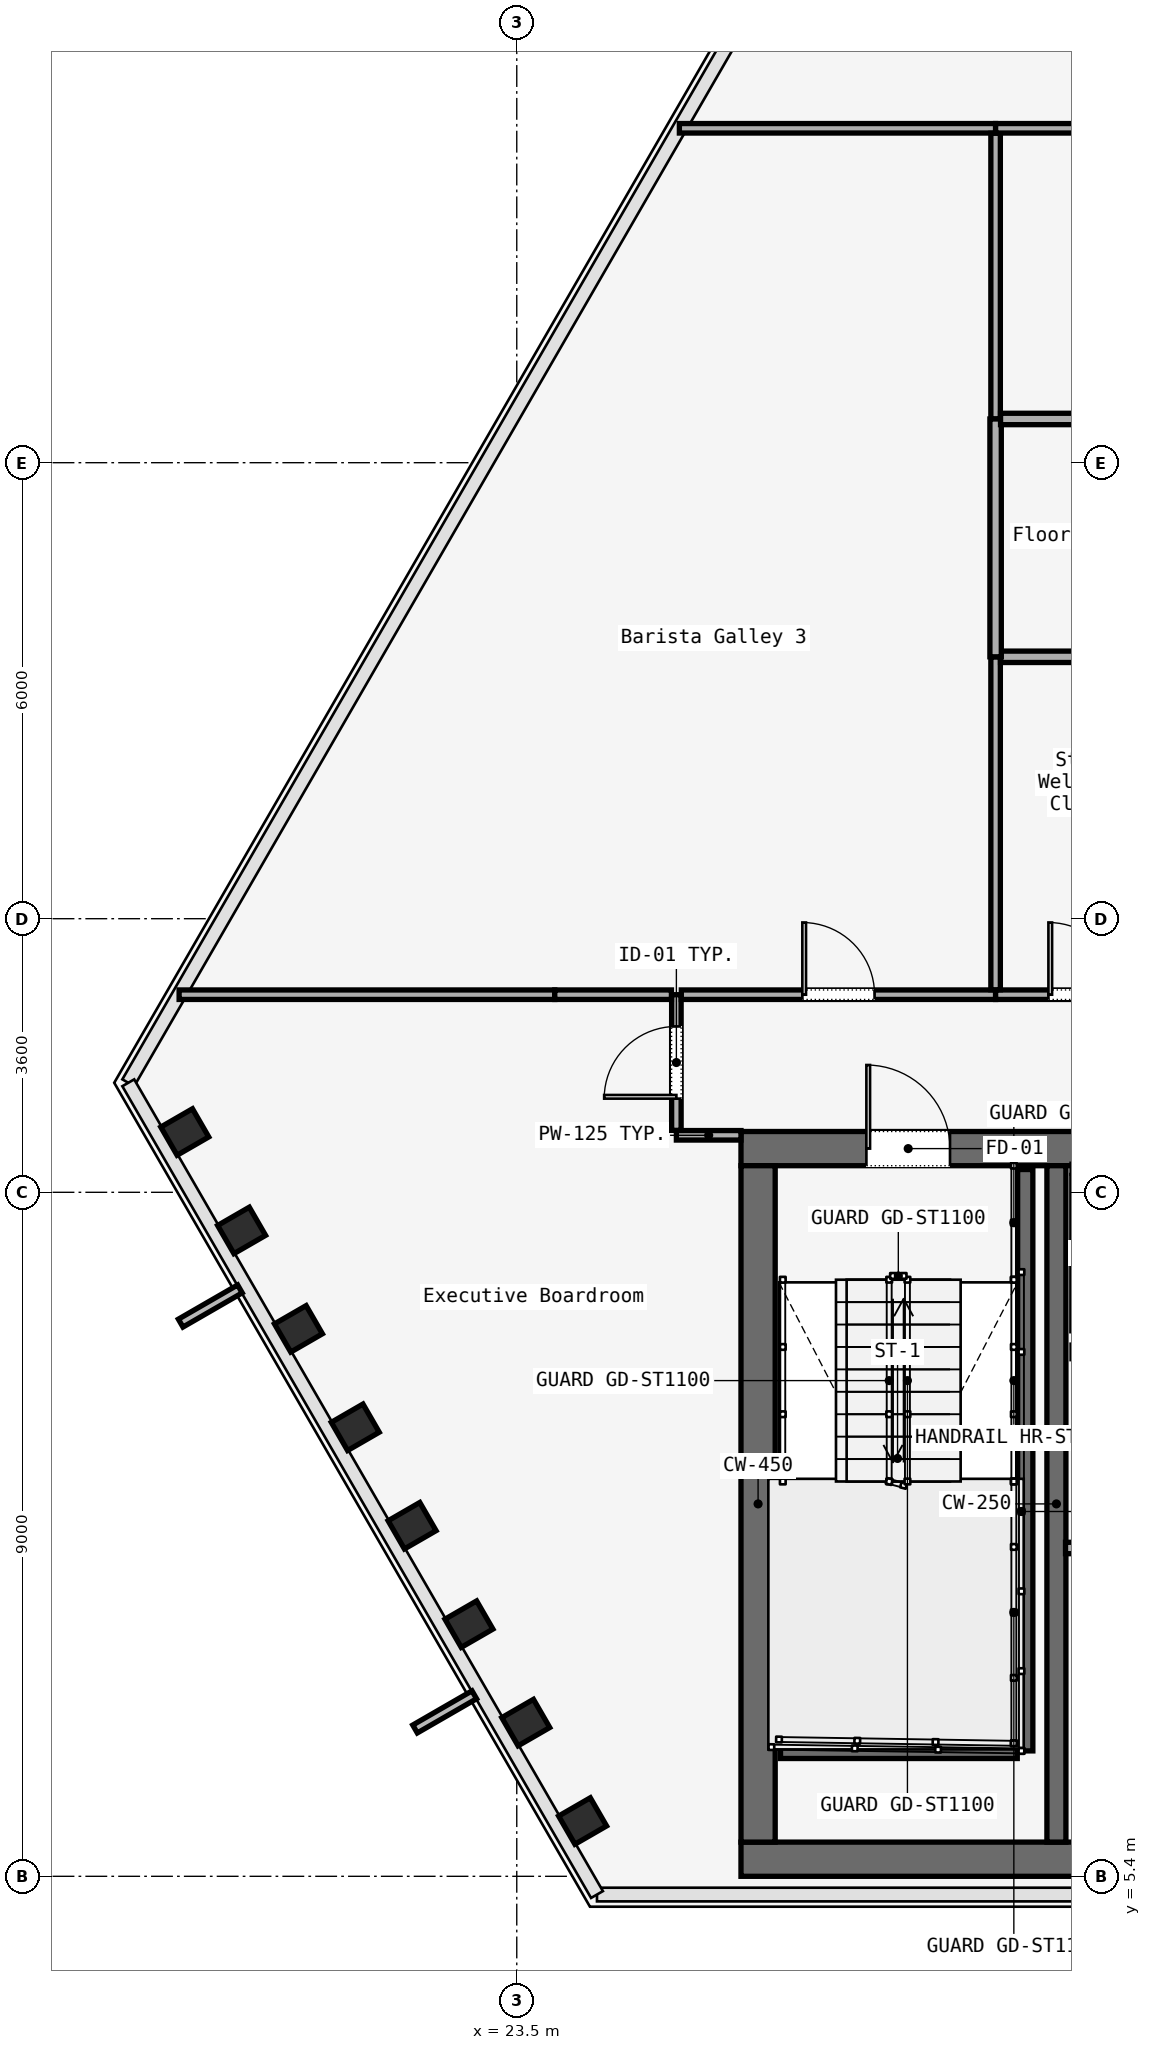
"""IFC4 building model, lengths in metres.
Left out: names, types, materials, properties, quantities, classifications, styles, units other than length and angle.
Written with IfcOpenShell. Run it as: python <this file> out.ifc"""

import sys

from ifc_helpers import new_model, si_unit, direction, frame, frame_2d, origin, origin_2d, place, context, subcontext, project, spatial, rectangle, i_section, extrude, element, fill, save


model = new_model("IFC4")
c1 = context("Model", 3, precision=1e-05, world=origin(), true_north=direction((0.0, 1.0)))
c2 = subcontext(c1, "Body", "Model", "MODEL_VIEW")
j1 = project(units=[si_unit("LENGTHUNIT", "METRE"), si_unit("PLANEANGLEUNIT", "RADIAN")], contexts=[c1])
p1 = place(None, origin())
s1 = spatial("IfcSite", under=j1, at=p1, CompositionType="ELEMENT")
p2 = place(p1, origin())
s2 = spatial("IfcBuilding", under=s1, at=p2, CompositionType="ELEMENT")
p3 = place(p2, frame((0.0, 0.0, 134.6)))
s3 = spatial("IfcBuildingStorey", under=s2, at=p3, CompositionType="ELEMENT", Elevation=134.6)
p4 = place(p3, frame((26.45, 14.975, 0.0), z_axis=(0.0, 0.0, 1.0), x_axis=(1.0, 0.0, 0.0)))
e1 = element("IfcWall", 1, at=p4, inside=s3, PredefinedType="SOLIDWALL", context=c2, shape_type="SweptSolid", body=[
    extrude(rectangle(XDim=31.1, YDim=0.45, at=frame_2d((15.55, 0.0))), origin(), (0.0, 0.0, 1.0), 3.58),
])
p5 = place(p4, frame((1.65, 0.0, 0.0)))
e2 = element("IfcOpeningElement", 2, at=p5, cuts=e1, PredefinedType="OPENING", context=c2, shape_type="SweptSolid", body=[
    extrude(rectangle(XDim=1.1, YDim=2.2, at=frame_2d((0.55, 1.1))), frame((0.0, 0.225, 0.0), z_axis=(0.0, -1.0, 0.0), x_axis=(1.0, 0.0, 0.0)), (0.0, 0.0, 1.0), 0.45),
])
p6 = place(p4, frame((13.65, 0.0, 0.0)))
e3 = element("IfcOpeningElement", 3, at=p6, cuts=e1, PredefinedType="OPENING", context=c2, shape_type="SweptSolid", body=[
    extrude(rectangle(XDim=1.1, YDim=2.2, at=frame_2d((0.55, 1.1))), frame((0.0, 0.225, 0.0), z_axis=(0.0, -1.0, 0.0), x_axis=(1.0, 0.0, 0.0)), (0.0, 0.0, 1.0), 0.45),
])
p7 = place(p4, frame((25.55, 0.0, 0.0)))
e4 = element("IfcOpeningElement", 4, at=p7, cuts=e1, PredefinedType="OPENING", context=c2, shape_type="SweptSolid", body=[
    extrude(rectangle(XDim=1.1, YDim=2.2, at=frame_2d((0.55, 1.1))), frame((0.0, 0.225, 0.0), z_axis=(0.0, -1.0, 0.0), x_axis=(1.0, 0.0, 0.0)), (0.0, 0.0, 1.0), 0.45),
])
p8 = place(p4, frame((10.7, 0.0, 0.0)))
e5 = element("IfcOpeningElement", 5, at=p8, cuts=e1, PredefinedType="OPENING", context=c2, shape_type="SweptSolid", body=[
    extrude(rectangle(XDim=1.4, YDim=2.2, at=frame_2d((0.7, 1.1))), frame((0.0, 0.225, 0.0), z_axis=(0.0, -1.0, 0.0), x_axis=(1.0, 0.0, 0.0)), (0.0, 0.0, 1.0), 0.45),
])
p9 = place(p4, frame((19.35, 0.0, 0.0)))
e6 = element("IfcOpeningElement", 6, at=p9, cuts=e1, PredefinedType="OPENING", context=c2, shape_type="SweptSolid", body=[
    extrude(rectangle(XDim=1.1, YDim=2.2, at=frame_2d((0.55, 1.1))), frame((0.0, 0.225, 0.0), z_axis=(0.0, -1.0, 0.0), x_axis=(1.0, 0.0, 0.0)), (0.0, 0.0, 1.0), 0.45),
])
p10 = place(p4, frame((21.4, 0.0, 0.0)))
e7 = element("IfcOpeningElement", 7, at=p10, cuts=e1, PredefinedType="OPENING", context=c2, shape_type="SweptSolid", body=[
    extrude(rectangle(XDim=0.9, YDim=2.1, at=frame_2d((0.45, 1.05))), frame((0.0, 0.225, 0.0), z_axis=(0.0, -1.0, 0.0), x_axis=(1.0, 0.0, 0.0)), (0.0, 0.0, 1.0), 0.45),
])
p11 = place(p4, frame((23.35, 0.0, 0.0)))
e8 = element("IfcOpeningElement", 8, at=p11, cuts=e1, PredefinedType="OPENING", context=c2, shape_type="SweptSolid", body=[
    extrude(rectangle(XDim=1.3, YDim=2.3, at=frame_2d((0.65, 1.15))), frame((0.0, 0.225, 0.0), z_axis=(0.0, -1.0, 0.0), x_axis=(1.0, 0.0, 0.0)), (0.0, 0.0, 1.0), 0.45),
])
p12 = place(p3, frame((26.45, 5.625, 0.0), z_axis=(0.0, 0.0, 1.0), x_axis=(1.0, 0.0, 0.0)))
e9 = element("IfcWall", 9, at=p12, inside=s3, PredefinedType="SOLIDWALL", context=c2, shape_type="SweptSolid", body=[
    extrude(rectangle(XDim=31.1, YDim=0.45, at=frame_2d((15.55, 0.0))), origin(), (0.0, 0.0, 1.0), 3.58),
])
p13 = place(p3, frame((26.675, 5.85, 0.0), z_axis=(0.0, 0.0, 1.0), x_axis=(0.0, 1.0, 0.0)))
e10 = element("IfcWall", 10, at=p13, inside=s3, PredefinedType="SOLIDWALL", context=c2, shape_type="SweptSolid", body=[
    extrude(rectangle(XDim=8.9, YDim=0.45, at=frame_2d((4.45, 0.0))), origin(), (0.0, 0.0, 1.0), 3.58),
])
p14 = place(p3, frame((30.6, 5.85, 0.0), z_axis=(0.0, 0.0, 1.0), x_axis=(0.0, 1.0, 0.0)))
e11 = element("IfcWall", 11, at=p14, inside=s3, PredefinedType="SOLIDWALL", context=c2, shape_type="SweptSolid", body=[
    extrude(rectangle(XDim=8.9, YDim=0.25, at=frame_2d((4.45, 0.0))), origin(), (0.0, 0.0, 1.0), 3.58),
])
p15 = place(p3, frame((19.132, 15.194, 0.0), z_axis=(-0.01278033811, -0.129291039507, 0.99152432651), x_axis=(-0.41310613672, 0.903705531327, 0.112515032126)))
e12 = element("IfcColumn", 12, at=p15, inside=s3, PredefinedType="COLUMN", context=c2, shape_type="SweptSolid", body=[
    extrude(i_section(OverallWidth=0.428, OverallDepth=0.481, WebThickness=0.051, FlangeThickness=0.065, FilletRadius=0.015, at=origin_2d()), origin(), (0.0, 0.0, 1.0), 3.61),
])
p16 = place(p3, frame((19.88, 13.898, 0.0), z_axis=(-0.02283170652, -0.112261536212, 0.993416358162), x_axis=(-0.31850718371, 0.942714283027, 0.099211665148)))
e13 = element("IfcColumn", 13, at=p16, inside=s3, PredefinedType="COLUMN", context=c2, shape_type="SweptSolid", body=[
    extrude(i_section(OverallWidth=0.428, OverallDepth=0.481, WebThickness=0.051, FlangeThickness=0.065, FilletRadius=0.015, at=origin_2d()), origin(), (0.0, 0.0, 1.0), 3.604),
])
p17 = place(p3, frame((20.627, 12.603, 0.0), z_axis=(-0.032772891404, -0.095129593681, 0.994925272568), x_axis=(-0.1920823235, 0.977502738868, 0.087136539429)))
e14 = element("IfcColumn", 14, at=p17, inside=s3, PredefinedType="COLUMN", context=c2, shape_type="SweptSolid", body=[
    extrude(i_section(OverallWidth=0.428, OverallDepth=0.481, WebThickness=0.051, FlangeThickness=0.065, FilletRadius=0.015, at=origin_2d()), origin(), (0.0, 0.0, 1.0), 3.598),
])
p18 = place(p3, frame((21.375, 11.308, 0.0), z_axis=(-0.042862996572, -0.077914195036, 0.99603822303), x_axis=(-0.022307462558, 0.996780559309, 0.077012295755)))
e15 = element("IfcColumn", 15, at=p18, inside=s3, PredefinedType="COLUMN", context=c2, shape_type="SweptSolid", body=[
    extrude(i_section(OverallWidth=0.428, OverallDepth=0.481, WebThickness=0.051, FlangeThickness=0.065, FilletRadius=0.015, at=origin_2d()), origin(), (0.0, 0.0, 1.0), 3.594),
])
p19 = place(p3, frame((22.123, 10.013, 0.0), z_axis=(-0.052886696014, -0.060636160468, 0.996757871014), x_axis=(0.190588187713, 0.979193970966, 0.069680054023)))
e16 = element("IfcColumn", 16, at=p19, inside=s3, PredefinedType="COLUMN", context=c2, shape_type="SweptSolid", body=[
    extrude(i_section(OverallWidth=0.428, OverallDepth=0.481, WebThickness=0.051, FlangeThickness=0.065, FilletRadius=0.015, at=origin_2d()), origin(), (0.0, 0.0, 1.0), 3.592),
])
p20 = place(p3, frame((22.871, 8.718, 0.0), z_axis=(-0.062899711011, -0.043315800988, 0.997079418973), x_axis=(0.427589893867, 0.90155000331, 0.066139807948)))
e17 = element("IfcColumn", 17, at=p20, inside=s3, PredefinedType="COLUMN", context=c2, shape_type="SweptSolid", body=[
    extrude(i_section(OverallWidth=0.428, OverallDepth=0.481, WebThickness=0.051, FlangeThickness=0.065, FilletRadius=0.015, at=origin_2d()), origin(), (0.0, 0.0, 1.0), 3.59),
])
p21 = place(p3, frame((23.618, 7.423, 0.0), z_axis=(-0.07288998382, -0.025973856175, 0.997001709655), x_axis=(0.645498709564, 0.760815827084, 0.0670126347)))
e18 = element("IfcColumn", 18, at=p21, inside=s3, PredefinedType="COLUMN", context=c2, shape_type="SweptSolid", body=[
    extrude(i_section(OverallWidth=0.428, OverallDepth=0.481, WebThickness=0.051, FlangeThickness=0.065, FilletRadius=0.015, at=origin_2d()), origin(), (0.0, 0.0, 1.0), 3.591),
])
p22 = place(p3, frame((24.366, 6.128, 0.0), z_axis=(-0.082845480977, -0.008699115312, 0.996524436065), x_axis=(0.806081735836, 0.587390797431, 0.072140739143)))
e19 = element("IfcColumn", 19, at=p22, inside=s3, PredefinedType="COLUMN", context=c2, shape_type="SweptSolid", body=[
    extrude(i_section(OverallWidth=0.428, OverallDepth=0.481, WebThickness=0.051, FlangeThickness=0.065, FilletRadius=0.015, at=origin_2d()), origin(), (0.0, 0.0, 1.0), 3.592),
])
p23 = place(p3, frame((30.19, 14.7, 0.0), z_axis=(0.0, 0.0, 1.0), x_axis=(0.0, -1.0, 0.0)))
e20 = element("IfcWall", 20, at=p23, inside=s3, PredefinedType="SOLIDWALL", context=c2, shape_type="SweptSolid", body=[
    extrude(rectangle(XDim=7.65, YDim=0.2, at=frame_2d((3.825, 0.0))), origin(), (0.0, 0.0, 1.0), 3.8),
])
p24 = place(p3, frame((26.97, 7.05, 0.0), z_axis=(0.0, 0.0, 1.0), x_axis=(1.0, 0.0, 0.0)))
e21 = element("IfcWall", 21, at=p24, inside=s3, PredefinedType="SOLIDWALL", context=c2, shape_type="SweptSolid", body=[
    extrude(rectangle(XDim=3.115, YDim=0.2, at=frame_2d((1.558, 0.0))), origin(), (0.0, 0.0, 1.0), 3.8),
])
p25 = place(p3, frame((30.72, 9.72, 0.0), z_axis=(0.0, 0.0, 1.0), x_axis=(1.0, 0.0, 0.0)))
e22 = element("IfcWall", 22, at=p25, inside=s3, PredefinedType="PARTITIONING", context=c2, shape_type="SweptSolid", body=[
    extrude(rectangle(XDim=7.96, YDim=0.15, at=frame_2d((3.98, 0.0))), origin(), (0.0, 0.0, 1.0), 3.01),
])
p26 = place(p25, frame((1.5, 0.0, 0.0)))
e23 = element("IfcOpeningElement", 23, at=p26, cuts=e22, PredefinedType="OPENING", context=c2, shape_type="SweptSolid", body=[
    extrude(rectangle(XDim=0.95, YDim=2.2, at=frame_2d((0.475, 1.1))), frame((0.0, 0.075, 0.0), z_axis=(0.0, -1.0, 0.0), x_axis=(1.0, 0.0, 0.0)), (0.0, 0.0, 1.0), 0.15),
])
p27 = place(p25, frame((6.21, 0.0, 0.0)))
e24 = element("IfcOpeningElement", 24, at=p27, cuts=e22, PredefinedType="OPENING", context=c2, shape_type="SweptSolid", body=[
    extrude(rectangle(XDim=0.95, YDim=2.2, at=frame_2d((0.475, 1.1))), frame((0.0, 0.075, 0.0), z_axis=(0.0, -1.0, 0.0), x_axis=(1.0, 0.0, 0.0)), (0.0, 0.0, 1.0), 0.15),
])
p28 = place(p3, frame((26.45, 15.15, 0.0), z_axis=(0.0, 0.0, 1.0), x_axis=(-1.0, 0.0, 0.0)))
e25 = element("IfcWall", 25, at=p28, inside=s3, PredefinedType="PARTITIONING", context=c2, shape_type="SweptSolid", body=[
    extrude(rectangle(XDim=0.85, YDim=0.125, at=frame_2d((0.425, 0.0))), origin(), (0.0, 0.0, 1.0), 3.01),
])
p29 = place(p3, frame((25.6, 15.215, 0.0), z_axis=(0.0, 0.0, 1.0), x_axis=(0.0, 1.0, 0.0)))
e26 = element("IfcWall", 26, at=p29, inside=s3, PredefinedType="PARTITIONING", context=c2, shape_type="SweptSolid", body=[
    extrude(rectangle(XDim=1.785, YDim=0.125, at=frame_2d((0.893, 0.0))), origin(), (0.0, 0.0, 1.0), 3.01),
])
p30 = place(p29, frame((0.417, 0.0, 0.0)))
e27 = element("IfcOpeningElement", 27, at=p30, cuts=e26, PredefinedType="OPENING", context=c2, shape_type="SweptSolid", body=[
    extrude(rectangle(XDim=0.95, YDim=2.2, at=frame_2d((0.475, 1.1))), frame((0.0, 0.062, 0.0), z_axis=(0.0, -1.0, 0.0), x_axis=(1.0, 0.0, 0.0)), (0.0, 0.0, 1.0), 0.125),
])
p31 = place(p3, frame((25.665, 17.0, 0.0), z_axis=(0.0, 0.0, 1.0), x_axis=(1.0, 0.0, 0.0)))
e28 = element("IfcWall", 28, at=p31, inside=s3, PredefinedType="PARTITIONING", context=c2, shape_type="SweptSolid", body=[
    extrude(rectangle(XDim=4.135, YDim=0.125, at=frame_2d((2.067, 0.0))), origin(), (0.0, 0.0, 1.0), 3.01),
])
p32 = place(p31, frame((1.593, 0.0, 0.0)))
e29 = element("IfcOpeningElement", 29, at=p32, cuts=e28, PredefinedType="OPENING", context=c2, shape_type="SweptSolid", body=[
    extrude(rectangle(XDim=0.95, YDim=2.2, at=frame_2d((0.475, 1.1))), frame((0.0, 0.062, 0.0), z_axis=(0.0, -1.0, 0.0), x_axis=(1.0, 0.0, 0.0)), (0.0, 0.0, 1.0), 0.125),
])
p33 = place(p3, frame((29.8, 17.0, 0.0), z_axis=(0.0, 0.0, 1.0), x_axis=(1.0, 0.0, 0.0)))
e30 = element("IfcWall", 30, at=p33, inside=s3, PredefinedType="PARTITIONING", context=c2, shape_type="SweptSolid", body=[
    extrude(rectangle(XDim=2.34, YDim=0.125, at=frame_2d((1.17, 0.0))), origin(), (0.0, 0.0, 1.0), 3.01),
])
p34 = place(p33, frame((0.695, 0.0, 0.0)))
e31 = element("IfcOpeningElement", 31, at=p34, cuts=e30, PredefinedType="OPENING", context=c2, shape_type="SweptSolid", body=[
    extrude(rectangle(XDim=0.95, YDim=2.2, at=frame_2d((0.475, 1.1))), frame((0.0, 0.062, 0.0), z_axis=(0.0, -1.0, 0.0), x_axis=(1.0, 0.0, 0.0)), (0.0, 0.0, 1.0), 0.125),
])
p35 = place(p3, frame((19.058, 17.0, 0.0), z_axis=(0.0, 0.0, 1.0), x_axis=(1.0, 0.0, 0.0)))
e32 = element("IfcWall", 32, at=p35, inside=s3, PredefinedType="PARTITIONING", context=c2, shape_type="SweptSolid", body=[
    extrude(rectangle(XDim=4.942, YDim=0.125, at=frame_2d((2.471, 0.0))), origin(), (0.0, 0.0, 1.0), 3.01),
])
p36 = place(p3, frame((24.0, 17.0, 0.0), z_axis=(0.0, 0.0, 1.0), x_axis=(1.0, 0.0, 0.0)))
e33 = element("IfcWall", 33, at=p36, inside=s3, PredefinedType="PARTITIONING", context=c2, shape_type="SweptSolid", body=[
    extrude(rectangle(XDim=1.535, YDim=0.125, at=frame_2d((0.768, 0.0))), origin(), (0.0, 0.0, 1.0), 3.01),
])
p37 = place(p3, frame((29.8, 17.065, 0.0), z_axis=(0.0, 0.0, 1.0), x_axis=(0.0, 1.0, 0.0)))
e34 = element("IfcWall", 34, at=p37, inside=s3, PredefinedType="PARTITIONING", context=c2, shape_type="SweptSolid", body=[
    extrude(rectangle(XDim=4.381, YDim=0.125, at=frame_2d((2.19, 0.0))), origin(), (0.0, 0.0, 1.0), 3.01),
])
p38 = place(p3, frame((29.865, 21.446, 0.0), z_axis=(0.0, 0.0, 1.0), x_axis=(1.0, 0.0, 0.0)))
e35 = element("IfcWall", 35, at=p38, inside=s3, PredefinedType="PARTITIONING", context=c2, shape_type="SweptSolid", body=[
    extrude(rectangle(XDim=2.21, YDim=0.15, at=frame_2d((1.105, 0.0))), origin(), (0.0, 0.0, 1.0), 3.01),
])
p39 = place(p3, frame((25.639, 28.4, 0.0), z_axis=(0.0, 0.0, 1.0), x_axis=(1.0, 0.0, 0.0)))
e36 = element("IfcWall", 36, at=p39, inside=s3, PredefinedType="PARTITIONING", context=c2, shape_type="SweptSolid", body=[
    extrude(rectangle(XDim=4.161, YDim=0.125, at=frame_2d((2.08, 0.0))), origin(), (0.0, 0.0, 1.0), 3.01),
])
p40 = place(p3, frame((29.8, 28.335, 0.0), z_axis=(0.0, 0.0, 1.0), x_axis=(0.0, -1.0, 0.0)))
e37 = element("IfcWall", 37, at=p40, inside=s3, PredefinedType="PARTITIONING", context=c2, shape_type="SweptSolid", body=[
    extrude(rectangle(XDim=3.76, YDim=0.125, at=frame_2d((1.88, 0.0))), origin(), (0.0, 0.0, 1.0), 3.01),
])
p41 = place(p3, frame((29.8, 24.575, 0.0), z_axis=(0.0, 0.0, 1.0), x_axis=(0.0, -1.0, 0.0)))
e38 = element("IfcWall", 38, at=p41, inside=s3, PredefinedType="PARTITIONING", context=c2, shape_type="SweptSolid", body=[
    extrude(rectangle(XDim=3.129, YDim=0.15, at=frame_2d((1.564, 0.0))), origin(), (0.0, 0.0, 1.0), 3.01),
])
p42 = place(p3, frame((29.865, 24.575, 0.0), z_axis=(0.0, 0.0, 1.0), x_axis=(1.0, 0.0, 0.0)))
e39 = element("IfcWall", 39, at=p42, inside=s3, PredefinedType="PARTITIONING", context=c2, shape_type="SweptSolid", body=[
    extrude(rectangle(XDim=5.87, YDim=0.15, at=frame_2d((2.935, 0.0))), origin(), (0.0, 0.0, 1.0), 3.01),
])
p43 = place(p3, frame((29.8, 28.4, 0.0), z_axis=(0.0, 0.0, 1.0), x_axis=(1.0, 0.0, 0.0)))
e40 = element("IfcWall", 40, at=p43, inside=s3, PredefinedType="PARTITIONING", context=c2, shape_type="SweptSolid", body=[
    extrude(rectangle(XDim=5.0, YDim=0.125, at=frame_2d((2.5, 0.0))), origin(), (0.0, 0.0, 1.0), 3.01),
])
p44 = place(p5, origin())
e41 = element("IfcDoor", 41, at=p44, inside=s3, OperationType="SINGLE_SWING_RIGHT", PredefinedType="DOOR", context=c2, shape_type="SweptSolid", body=[
    extrude(rectangle(XDim=1.1, YDim=2.2, at=frame_2d((0.55, 1.1))), frame((0.0, 0.025, 0.0), z_axis=(0.0, -1.0, 0.0), x_axis=(1.0, 0.0, 0.0)), (0.0, 0.0, 1.0), 0.05),
])
fill(e2, e41)
p45 = place(p30, origin())
e42 = element("IfcDoor", 42, at=p45, inside=s3, OperationType="SINGLE_SWING_RIGHT", PredefinedType="DOOR", context=c2, shape_type="SweptSolid", body=[
    extrude(rectangle(XDim=0.95, YDim=2.2, at=frame_2d((0.475, 1.1))), frame((0.0, 0.025, 0.0), z_axis=(0.0, -1.0, 0.0), x_axis=(1.0, 0.0, 0.0)), (0.0, 0.0, 1.0), 0.05),
])
fill(e27, e42)
p46 = place(p34, origin())
e43 = element("IfcDoor", 43, at=p46, inside=s3, OperationType="SINGLE_SWING_RIGHT", PredefinedType="DOOR", context=c2, shape_type="SweptSolid", body=[
    extrude(rectangle(XDim=0.95, YDim=2.2, at=frame_2d((0.475, 1.1))), frame((0.0, 0.025, 0.0), z_axis=(0.0, -1.0, 0.0), x_axis=(1.0, 0.0, 0.0)), (0.0, 0.0, 1.0), 0.05),
])
fill(e31, e43)
p47 = place(p32, origin())
e44 = element("IfcDoor", 44, at=p47, inside=s3, OperationType="SINGLE_SWING_LEFT", PredefinedType="DOOR", context=c2, shape_type="SweptSolid", body=[
    extrude(rectangle(XDim=0.95, YDim=2.2, at=frame_2d((0.475, 1.1))), frame((0.0, 0.025, 0.0), z_axis=(0.0, -1.0, 0.0), x_axis=(1.0, 0.0, 0.0)), (0.0, 0.0, 1.0), 0.05),
])
fill(e29, e44)
save(model, sys.argv[1])
